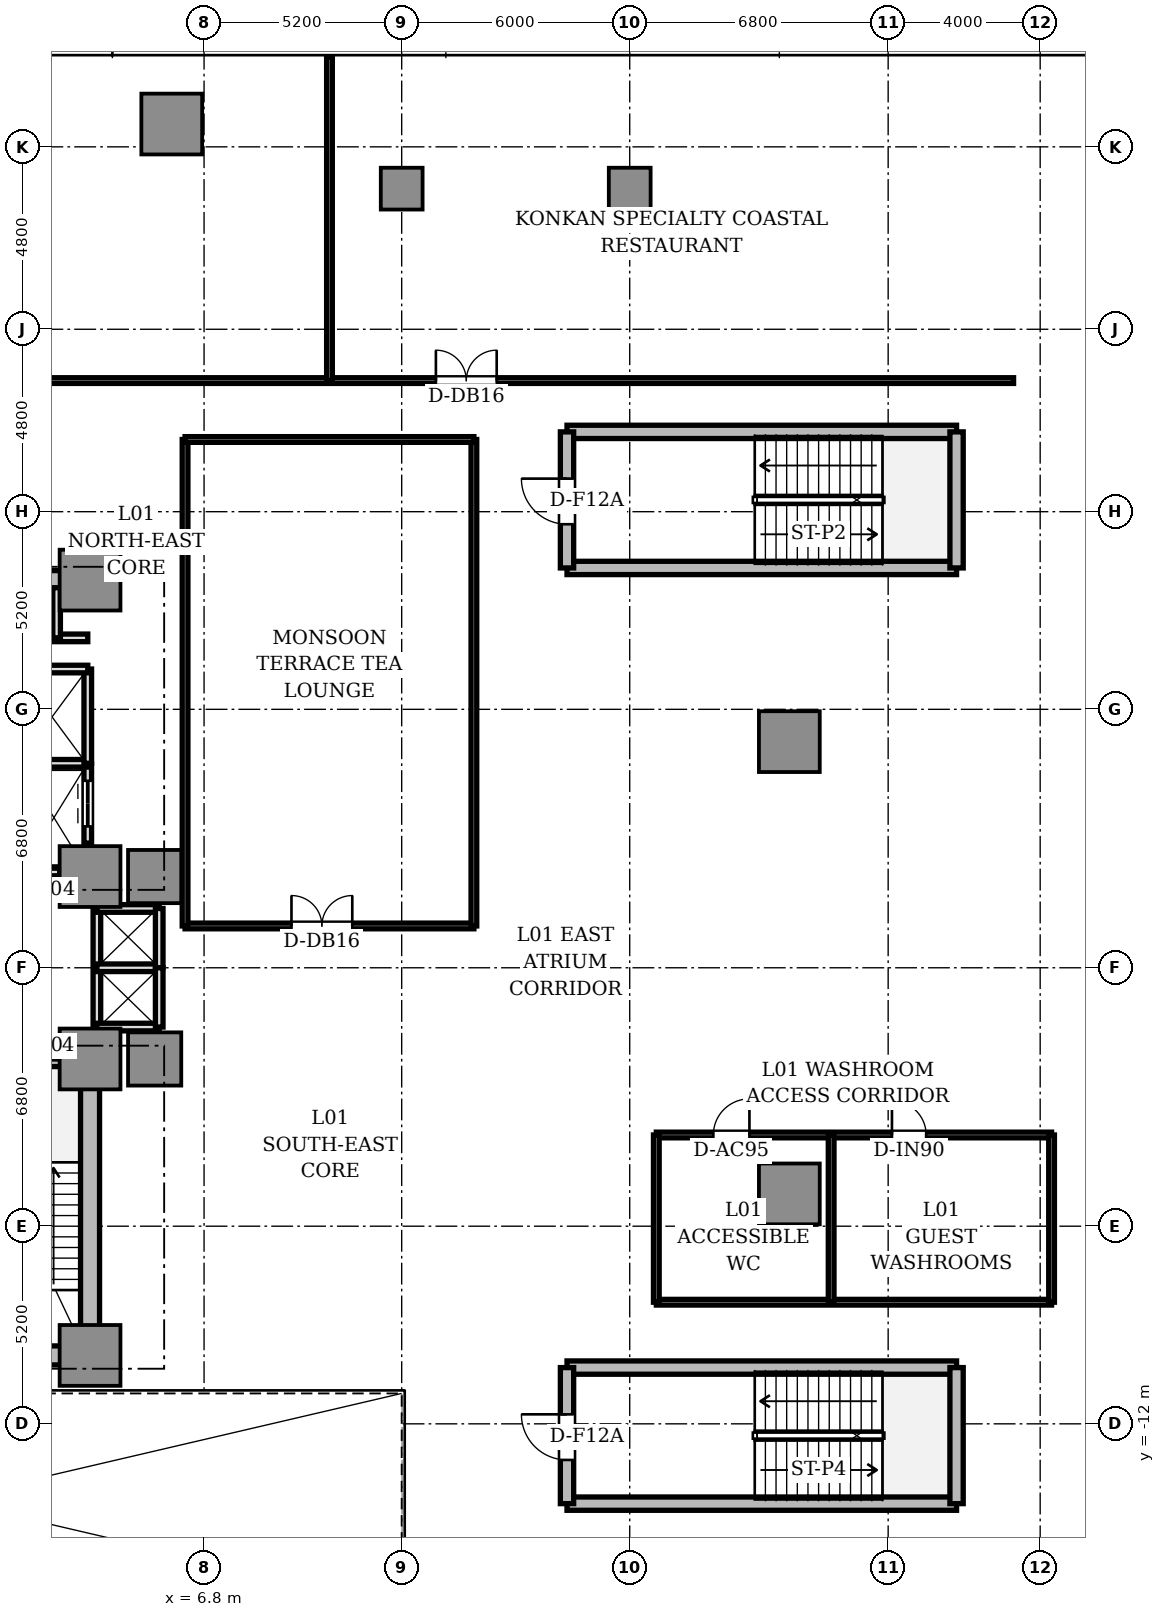
"""IFC4 building model, lengths in metres.
Left out: names, types, materials, properties, quantities, classifications, styles, units other than length and angle.
Written with IfcOpenShell. Run it as: python <this file> out.ifc"""

import sys

from ifc_helpers import new_model, si_unit, direction, frame, frame_2d, origin, origin_2d, place, context, subcontext, project, spatial, rectangle, circle, extrude, source, transform, mapped, element, fill, save


model = new_model("IFC4")
c1 = context("Model", 3, precision=1e-05, world=origin(), true_north=direction((0.0, 1.0)))
c2 = subcontext(c1, "Body", "Model", "MODEL_VIEW")
j1 = project(units=[si_unit("LENGTHUNIT", "METRE"), si_unit("PLANEANGLEUNIT", "RADIAN")], contexts=[c1])
p1 = place(None, origin())
s1 = spatial("IfcSite", under=j1, at=p1, CompositionType="ELEMENT")
p2 = place(p1, origin())
s2 = spatial("IfcBuilding", under=s1, at=p2, CompositionType="ELEMENT")
p3 = place(p2, frame((0.0, 0.0, 4.8)))
s3 = spatial("IfcBuildingStorey", under=s2, at=p3, CompositionType="ELEMENT", Elevation=4.8)
for number, where, z_axis, x_axis in (
    (1, (-3.55, 10.2, 0.0), (0.0, 0.0, 1.0), (1.0, 0.0, 0.0)),
    (2, (-3.55, -10.2, 0.0), (0.0, 0.0, 1.0), (1.0, 0.0, 0.0)),
):
    element("IfcWall", number, at=place(p3, frame(where, z_axis=z_axis, x_axis=x_axis)), inside=s3, PredefinedType="SHEAR", context=c2, shape_type="SweptSolid", body=[
        extrude(rectangle(XDim=7.1, YDim=0.5, at=frame_2d((3.55, 0.0))), origin(), (0.0, 0.0, 1.0), 4.1),
    ])
p4 = place(p3, frame((3.8, -9.75, 0.0), z_axis=(0.0, 0.0, 1.0), x_axis=(0.0, 1.0, 0.0)))
e3 = element("IfcWall", 3, at=p4, inside=s3, PredefinedType="SHEAR", context=c2, shape_type="SweptSolid", body=[
    extrude(rectangle(XDim=6.9, YDim=0.5, at=frame_2d((3.45, 0.0))), origin(), (0.0, 0.0, 1.0), 4.1),
])
m1 = source(origin(), c2, "Body", "SweptSolid", [
    extrude(rectangle(XDim=1.6, YDim=1.6, at=origin_2d()), origin(), (0.0, 0.0, 1.0), 4.1),
])
for number, where, z_axis, x_axis in (
    (4, (3.8, 2.4, 0.0), (0.0, 0.0, 1.0), (1.0, 0.0, 0.0)),
    (5, (3.8, 10.2, 0.0), (0.0, 0.0, 1.0), (1.0, 0.0, 0.0)),
    (6, (3.8, -2.4, 0.0), (0.0, 0.0, 1.0), (1.0, 0.0, 0.0)),
    (7, (3.8, -10.2, 0.0), (0.0, 0.0, 1.0), (1.0, 0.0, 0.0)),
):
    element("IfcColumn", number, at=place(p3, frame(where, z_axis=z_axis, x_axis=x_axis)), inside=s3, PredefinedType="COLUMN", context=c2, shape_type="MappedRepresentation", body=[
        mapped(m1, transform((0.0, 0.0, 0.0), scale=1.0)),
    ])
m2 = source(origin(), c2, "Body", "SweptSolid", [
    extrude(rectangle(XDim=1.4, YDim=1.4, at=origin_2d()), origin(), (0.0, 0.0, 1.0), 4.1),
])
for number, where, z_axis, x_axis in (
    (8, (5.5, 2.4, 0.0), (0.0, 0.0, 1.0), (1.0, 0.0, 0.0)),
    (9, (5.5, -2.4, 0.0), (0.0, 0.0, 1.0), (1.0, 0.0, 0.0)),
):
    element("IfcColumn", number, at=place(p3, frame(where, z_axis=z_axis, x_axis=x_axis)), inside=s3, PredefinedType="COLUMN", context=c2, shape_type="MappedRepresentation", body=[
        mapped(m2, transform((0.0, 0.0, 0.0), scale=1.0)),
    ])
for number, where, z_axis, x_axis in (
    (10, (22.2, -5.95, 0.0), (0.0, 0.0, 1.0), (1.0, 0.0, 0.0)),
    (11, (22.2, 5.95, 0.0), (0.0, 0.0, 1.0), (1.0, 0.0, 0.0)),
    (12, (5.95, 22.2, 0.0), (0.0, 0.0, 1.0), (1.0, 0.0, 0.0)),
):
    element("IfcColumn", number, at=place(p3, frame(where, z_axis=z_axis, x_axis=x_axis)), inside=s3, PredefinedType="COLUMN", context=c2, shape_type="MappedRepresentation", body=[
        mapped(m1, transform((0.0, 0.0, 0.0), scale=1.0)),
    ])
m3 = source(origin(), c2, "Body", "SweptSolid", [
    extrude(circle(Radius=0.55, at=origin_2d()), origin(), (0.0, 0.0, 1.0), 4.1),
])
for number, where, z_axis, x_axis in (
    (13, (12.0, 20.5, 0.0), (0.0, 0.0, 1.0), (1.0, 0.0, 0.0)),
    (14, (18.0, 20.5, 0.0), (0.0, 0.0, 1.0), (1.0, 0.0, 0.0)),
):
    element("IfcColumn", number, at=place(p3, frame(where, z_axis=z_axis, x_axis=x_axis)), inside=s3, PredefinedType="COLUMN", context=c2, shape_type="MappedRepresentation", body=[
        mapped(m3, transform((0.0, 0.0, 0.0), scale=1.0)),
    ])
p5 = place(p3, frame((0.0, -2.5, 0.0), z_axis=(0.0, 0.0, 1.0), x_axis=(1.0, 0.0, 0.0)))
e15 = element("IfcWall", 15, at=p5, inside=s3, PredefinedType="SOLIDWALL", context=c2, shape_type="SweptSolid", body=[
    extrude(rectangle(XDim=3.72, YDim=0.2, at=frame_2d((1.86, 0.0))), origin(), (0.0, 0.0, 1.0), 4.1),
])
p6 = place(p3, frame((2.0, 2.52, 0.0), z_axis=(0.0, 0.0, 1.0), x_axis=(1.0, 0.0, 0.0)))
e16 = element("IfcWall", 16, at=p6, inside=s3, PredefinedType="SOLIDWALL", context=c2, shape_type="SweptSolid", body=[
    extrude(rectangle(XDim=1.0, YDim=0.2, at=frame_2d((0.5, 0.0))), origin(), (0.0, 0.0, 1.0), 3.65),
])
p7 = place(p3, frame((3.74, 3.28, 0.0), z_axis=(0.0, 0.0, 1.0), x_axis=(0.0, 1.0, 0.0)))
e17 = element("IfcWall", 17, at=p7, inside=s3, PredefinedType="SOLIDWALL", context=c2, shape_type="SweptSolid", body=[
    extrude(rectangle(XDim=2.08, YDim=0.2, at=frame_2d((1.04, 0.0))), origin(), (0.0, 0.0, 1.0), 3.65),
])
p8 = place(p7, frame((0.44, 0.0, 0.0)))
e18 = element("IfcOpeningElement", 18, at=p8, cuts=e17, PredefinedType="OPENING", context=c2, shape_type="SweptSolid", body=[
    extrude(rectangle(XDim=1.2, YDim=2.2, at=frame_2d((0.6, 1.1))), frame((0.0, 0.11, 0.0), z_axis=(0.0, -1.0, 0.0), x_axis=(1.0, 0.0, 0.0)), (0.0, 0.0, 1.0), 0.22),
])
p9 = place(p3, frame((0.05, 5.38, 0.0), z_axis=(0.0, 0.0, 1.0), x_axis=(1.0, 0.0, 0.0)))
e19 = element("IfcWall", 19, at=p9, inside=s3, PredefinedType="SOLIDWALL", context=c2, shape_type="SweptSolid", body=[
    extrude(rectangle(XDim=3.69, YDim=0.2, at=frame_2d((1.845, 0.0))), origin(), (0.0, 0.0, 1.0), 3.65),
])
p10 = place(p3, frame((3.74, 5.38, 0.0), z_axis=(0.0, 0.0, 1.0), x_axis=(0.0, 1.0, 0.0)))
e20 = element("IfcWall", 20, at=p10, inside=s3, PredefinedType="SOLIDWALL", context=c2, shape_type="SweptSolid", body=[
    extrude(rectangle(XDim=2.48, YDim=0.2, at=frame_2d((1.24, 0.0))), origin(), (0.0, 0.0, 1.0), 3.65),
])
p11 = place(p3, frame((1.9, 7.86, 0.0), z_axis=(0.0, 0.0, 1.0), x_axis=(1.0, 0.0, 0.0)))
e21 = element("IfcWall", 21, at=p11, inside=s3, PredefinedType="SOLIDWALL", context=c2, shape_type="SweptSolid", body=[
    extrude(rectangle(XDim=1.84, YDim=0.2, at=frame_2d((0.92, 0.0))), origin(), (0.0, 0.0, 1.0), 3.65),
])
p12 = place(p3, frame((3.98, -1.56, 0.0), z_axis=(0.0, 0.0, 1.0), x_axis=(0.0, 1.0, 0.0)))
e22 = element("IfcWall", 22, at=p12, inside=s3, PredefinedType="SOLIDWALL", context=c2, shape_type="SweptSolid", body=[
    extrude(rectangle(XDim=3.12, YDim=0.2, at=frame_2d((1.56, 0.0))), origin(), (0.0, 0.0, 1.0), 3.17),
])
for number, where, z_axis, x_axis in (
    (23, (3.98, 1.56, 0.0), (0.0, 0.0, 1.0), (1.0, 0.0, 0.0)),
    (24, (3.98, -1.56, 0.0), (0.0, 0.0, 1.0), (1.0, 0.0, 0.0)),
    (25, (3.98, 0.0, 0.0), (0.0, 0.0, 1.0), (1.0, 0.0, 0.0)),
):
    element("IfcWall", number, at=place(p3, frame(where, z_axis=z_axis, x_axis=x_axis)), inside=s3, PredefinedType="SOLIDWALL", context=c2, shape_type="SweptSolid", body=[
        extrude(rectangle(XDim=1.64, YDim=0.2, at=frame_2d((0.82, 0.0))), origin(), (0.0, 0.0, 1.0), 3.65),
    ])
for number, where, z_axis, x_axis in (
    (26, (5.62, 0.0, 0.0), (0.0, 0.0, 1.0), (0.0, 1.0, 0.0)),
    (27, (5.62, -1.56, 0.0), (0.0, 0.0, 1.0), (0.0, 1.0, 0.0)),
):
    element("IfcWall", number, at=place(p3, frame(where, z_axis=z_axis, x_axis=x_axis)), inside=s3, PredefinedType="SOLIDWALL", context=c2, shape_type="SweptSolid", body=[
        extrude(rectangle(XDim=1.56, YDim=0.2, at=frame_2d((0.78, 0.0))), origin(), (0.0, 0.0, 1.0), 3.65),
    ])
p13 = place(p3, frame((0.12, 8.68, 0.0), z_axis=(0.0, 0.0, 1.0), x_axis=(1.0, 0.0, 0.0)))
e28 = element("IfcWall", 28, at=p13, inside=s3, PredefinedType="SOLIDWALL", context=c2, shape_type="SweptSolid", body=[
    extrude(rectangle(XDim=3.62, YDim=0.2, at=frame_2d((1.81, 0.0))), origin(), (0.0, 0.0, 1.0), 3.65),
])
p14 = place(p13, frame((1.75, 0.0, 0.0)))
e29 = element("IfcOpeningElement", 29, at=p14, cuts=e28, PredefinedType="OPENING", context=c2, shape_type="SweptSolid", body=[
    extrude(rectangle(XDim=0.95, YDim=2.15, at=frame_2d((0.475, 1.075))), frame((0.0, 0.11, 0.0), z_axis=(0.0, -1.0, 0.0), x_axis=(1.0, 0.0, 0.0)), (0.0, 0.0, 1.0), 0.22),
])
p15 = place(p3, frame((2.92, 8.68, 0.0), z_axis=(0.0, 0.0, 1.0), x_axis=(0.0, 1.0, 0.0)))
e30 = element("IfcWall", 30, at=p15, inside=s3, PredefinedType="SOLIDWALL", context=c2, shape_type="SweptSolid", body=[
    extrude(rectangle(XDim=1.32, YDim=0.2, at=frame_2d((0.66, 0.0))), origin(), (0.0, 0.0, 1.0), 3.65),
])
for number, where, z_axis, x_axis in (
    (31, (16.35, 14.1, 0.0), (0.0, 0.0, 1.0), (1.0, 0.0, 0.0)),
    (32, (16.35, 10.52, 0.0), (0.0, 0.0, 1.0), (1.0, 0.0, 0.0)),
):
    element("IfcWall", number, at=place(p3, frame(where, z_axis=z_axis, x_axis=x_axis)), inside=s3, PredefinedType="SHEAR", context=c2, shape_type="SweptSolid", body=[
        extrude(rectangle(XDim=10.25, YDim=0.35, at=frame_2d((5.125, 0.0))), origin(), (0.0, 0.0, 1.0), 4.1),
    ])
p16 = place(p3, frame((16.35, 10.52, 0.0), z_axis=(0.0, 0.0, 1.0), x_axis=(0.0, 1.0, 0.0)))
e33 = element("IfcWall", 33, at=p16, inside=s3, PredefinedType="SHEAR", context=c2, shape_type="SweptSolid", body=[
    extrude(rectangle(XDim=3.58, YDim=0.35, at=frame_2d((1.79, 0.0))), origin(), (0.0, 0.0, 1.0), 4.1),
])
p17 = place(p16, frame((1.15, 0.0, 0.0)))
e34 = element("IfcOpeningElement", 34, at=p17, cuts=e33, PredefinedType="OPENING", context=c2, shape_type="SweptSolid", body=[
    extrude(rectangle(XDim=1.2, YDim=2.2, at=frame_2d((0.6, 1.1))), frame((0.0, 0.185, 0.0), z_axis=(0.0, -1.0, 0.0), x_axis=(1.0, 0.0, 0.0)), (0.0, 0.0, 1.0), 0.37),
])
p18 = place(p3, frame((26.6, 10.52, 0.0), z_axis=(0.0, 0.0, 1.0), x_axis=(0.0, 1.0, 0.0)))
e35 = element("IfcWall", 35, at=p18, inside=s3, PredefinedType="SHEAR", context=c2, shape_type="SweptSolid", body=[
    extrude(rectangle(XDim=3.58, YDim=0.35, at=frame_2d((1.79, 0.0))), origin(), (0.0, 0.0, 1.0), 4.1),
])
for number, where, z_axis, x_axis in (
    (36, (16.35, -10.52, 0.0), (0.0, 0.0, 1.0), (1.0, 0.0, 0.0)),
    (37, (16.35, -14.1, 0.0), (0.0, 0.0, 1.0), (1.0, 0.0, 0.0)),
):
    element("IfcWall", number, at=place(p3, frame(where, z_axis=z_axis, x_axis=x_axis)), inside=s3, PredefinedType="SHEAR", context=c2, shape_type="SweptSolid", body=[
        extrude(rectangle(XDim=10.25, YDim=0.35, at=frame_2d((5.125, 0.0))), origin(), (0.0, 0.0, 1.0), 4.1),
    ])
p19 = place(p3, frame((16.35, -14.1, 0.0), z_axis=(0.0, 0.0, 1.0), x_axis=(0.0, 1.0, 0.0)))
e38 = element("IfcWall", 38, at=p19, inside=s3, PredefinedType="SHEAR", context=c2, shape_type="SweptSolid", body=[
    extrude(rectangle(XDim=3.58, YDim=0.35, at=frame_2d((1.79, 0.0))), origin(), (0.0, 0.0, 1.0), 4.1),
])
p20 = place(p19, frame((1.15, 0.0, 0.0)))
e39 = element("IfcOpeningElement", 39, at=p20, cuts=e38, PredefinedType="OPENING", context=c2, shape_type="SweptSolid", body=[
    extrude(rectangle(XDim=1.2, YDim=2.2, at=frame_2d((0.6, 1.1))), frame((0.0, 0.185, 0.0), z_axis=(0.0, -1.0, 0.0), x_axis=(1.0, 0.0, 0.0)), (0.0, 0.0, 1.0), 0.37),
])
p21 = place(p3, frame((26.6, -14.1, 0.0), z_axis=(0.0, 0.0, 1.0), x_axis=(0.0, 1.0, 0.0)))
e40 = element("IfcWall", 40, at=p21, inside=s3, PredefinedType="SHEAR", context=c2, shape_type="SweptSolid", body=[
    extrude(rectangle(XDim=3.58, YDim=0.35, at=frame_2d((1.79, 0.0))), origin(), (0.0, 0.0, 1.0), 4.1),
])
p22 = place(p3, frame((-25.1, 15.45, 0.0), z_axis=(0.0, 0.0, 1.0), x_axis=(1.0, 0.0, 0.0)))
e41 = element("IfcWall", 41, at=p22, inside=s3, PredefinedType="PARTITIONING", context=c2, shape_type="SweptSolid", body=[
    extrude(rectangle(XDim=53.2, YDim=0.15, at=frame_2d((26.6, 0.0))), origin(), (0.0, 0.0, 1.0), 3.65),
])
p23 = place(p22, frame((19.5, 0.0, 0.0)))
e42 = element("IfcOpeningElement", 42, at=p23, cuts=e41, PredefinedType="OPENING", context=c2, shape_type="SweptSolid", body=[
    extrude(rectangle(XDim=1.6, YDim=2.25, at=frame_2d((0.8, 1.125))), frame((0.0, 0.085, 0.0), z_axis=(0.0, -1.0, 0.0), x_axis=(1.0, 0.0, 0.0)), (0.0, 0.0, 1.0), 0.17),
])
p24 = place(p22, frame((38.0, 0.0, 0.0)))
e43 = element("IfcOpeningElement", 43, at=p24, cuts=e41, PredefinedType="OPENING", context=c2, shape_type="SweptSolid", body=[
    extrude(rectangle(XDim=1.6, YDim=2.25, at=frame_2d((0.8, 1.125))), frame((0.0, 0.085, 0.0), z_axis=(0.0, -1.0, 0.0), x_axis=(1.0, 0.0, 0.0)), (0.0, 0.0, 1.0), 0.17),
])
p25 = place(p3, frame((10.1, 15.45, 0.0), z_axis=(0.0, 0.0, 1.0), x_axis=(0.0, 1.0, 0.0)))
e44 = element("IfcWall", 44, at=p25, inside=s3, PredefinedType="PARTITIONING", context=c2, shape_type="SweptSolid", body=[
    extrude(rectangle(XDim=8.52, YDim=0.15, at=frame_2d((4.26, 0.0))), origin(), (0.0, 0.0, 1.0), 3.65),
])
p26 = place(p3, frame((6.3, 1.1, 0.0), z_axis=(0.0, 0.0, 1.0), x_axis=(1.0, 0.0, 0.0)))
e45 = element("IfcWall", 45, at=p26, inside=s3, PredefinedType="PARTITIONING", context=c2, shape_type="SweptSolid", body=[
    extrude(rectangle(XDim=7.6, YDim=0.15, at=frame_2d((3.8, 0.0))), origin(), (0.0, 0.0, 1.0), 3.65),
])
p27 = place(p26, frame((2.8, 0.0, 0.0)))
e46 = element("IfcOpeningElement", 46, at=p27, cuts=e45, PredefinedType="OPENING", context=c2, shape_type="SweptSolid", body=[
    extrude(rectangle(XDim=1.6, YDim=2.25, at=frame_2d((0.8, 1.125))), frame((0.0, 0.085, 0.0), z_axis=(0.0, -1.0, 0.0), x_axis=(1.0, 0.0, 0.0)), (0.0, 0.0, 1.0), 0.17),
])
for number, where, z_axis, x_axis in (
    (47, (6.3, 1.1, 0.0), (0.0, 0.0, 1.0), (0.0, 1.0, 0.0)),
    (48, (13.9, 1.1, 0.0), (0.0, 0.0, 1.0), (0.0, 1.0, 0.0)),
):
    element("IfcWall", number, at=place(p3, frame(where, z_axis=z_axis, x_axis=x_axis)), inside=s3, PredefinedType="PARTITIONING", context=c2, shape_type="SweptSolid", body=[
        extrude(rectangle(XDim=12.8, YDim=0.15, at=frame_2d((6.4, 0.0))), origin(), (0.0, 0.0, 1.0), 3.65),
    ])
p28 = place(p3, frame((6.3, 13.9, 0.0), z_axis=(0.0, 0.0, 1.0), x_axis=(1.0, 0.0, 0.0)))
e49 = element("IfcWall", 49, at=p28, inside=s3, PredefinedType="PARTITIONING", context=c2, shape_type="SweptSolid", body=[
    extrude(rectangle(XDim=7.6, YDim=0.15, at=frame_2d((3.8, 0.0))), origin(), (0.0, 0.0, 1.0), 3.65),
])
p29 = place(p3, frame((18.7, -4.4, 0.0), z_axis=(0.0, 0.0, 1.0), x_axis=(1.0, 0.0, 0.0)))
e50 = element("IfcWall", 50, at=p29, inside=s3, PredefinedType="PARTITIONING", context=c2, shape_type="SweptSolid", body=[
    extrude(rectangle(XDim=10.4, YDim=0.15, at=frame_2d((5.2, 0.0))), origin(), (0.0, 0.0, 1.0), 3.57),
])
p30 = place(p29, frame((1.5, 0.0, 0.0)))
e51 = element("IfcOpeningElement", 51, at=p30, cuts=e50, PredefinedType="OPENING", context=c2, shape_type="SweptSolid", body=[
    extrude(rectangle(XDim=0.95, YDim=2.15, at=frame_2d((0.475, 1.075))), frame((0.0, 0.085, 0.0), z_axis=(0.0, -1.0, 0.0), x_axis=(1.0, 0.0, 0.0)), (0.0, 0.0, 1.0), 0.17),
])
p31 = place(p29, frame((6.2, 0.0, 0.0)))
e52 = element("IfcOpeningElement", 52, at=p31, cuts=e50, PredefinedType="OPENING", context=c2, shape_type="SweptSolid", body=[
    extrude(rectangle(XDim=0.9, YDim=2.1, at=frame_2d((0.45, 1.05))), frame((0.0, 0.085, 0.0), z_axis=(0.0, -1.0, 0.0), x_axis=(1.0, 0.0, 0.0)), (0.0, 0.0, 1.0), 0.17),
])
p32 = place(p3, frame((18.7, -8.8, 0.0), z_axis=(0.0, 0.0, 1.0), x_axis=(1.0, 0.0, 0.0)))
e53 = element("IfcWall", 53, at=p32, inside=s3, PredefinedType="PARTITIONING", context=c2, shape_type="SweptSolid", body=[
    extrude(rectangle(XDim=10.4, YDim=0.15, at=frame_2d((5.2, 0.0))), origin(), (0.0, 0.0, 1.0), 3.65),
])
for number, where, z_axis, x_axis in (
    (54, (18.7, -8.8, 0.0), (0.0, 0.0, 1.0), (0.0, 1.0, 0.0)),
    (55, (23.3, -8.8, 0.0), (0.0, 0.0, 1.0), (0.0, 1.0, 0.0)),
    (56, (29.1, -8.8, 0.0), (0.0, 0.0, 1.0), (0.0, 1.0, 0.0)),
):
    element("IfcWall", number, at=place(p3, frame(where, z_axis=z_axis, x_axis=x_axis)), inside=s3, PredefinedType="PARTITIONING", context=c2, shape_type="SweptSolid", body=[
        extrude(rectangle(XDim=4.4, YDim=0.15, at=frame_2d((2.2, 0.0))), origin(), (0.0, 0.0, 1.0), 3.65),
    ])
m4 = source(origin(), c2, "Body", "SweptSolid", [
    extrude(rectangle(XDim=1.2, YDim=0.05, at=origin_2d()), origin(), (0.0, 0.0, 1.0), 2.2),
])
p33 = place(p8, frame((0.6, 0.0, 0.0)))
e57 = element("IfcDoor", 57, at=p33, inside=s3, OperationType="DOUBLE_DOOR_SLIDING", PredefinedType="DOOR", context=c2, shape_type="MappedRepresentation", body=[
    mapped(m4, transform((0.0, 0.0, 0.0), scale=1.0)),
])
fill(e18, e57)
m5 = source(origin(), c2, "Body", "SweptSolid", [
    extrude(rectangle(XDim=0.95, YDim=0.05, at=origin_2d()), origin(), (0.0, 0.0, 1.0), 2.15),
])
p34 = place(p14, frame((0.475, 0.0, 0.0)))
e58 = element("IfcDoor", 58, at=p34, inside=s3, OperationType="SINGLE_SWING_RIGHT", PredefinedType="DOOR", context=c2, shape_type="MappedRepresentation", body=[
    mapped(m5, transform((0.0, 0.0, 0.0), scale=1.0)),
])
fill(e29, e58)
p35 = place(p17, frame((0.6, 0.0, 0.0)))
e59 = element("IfcDoor", 59, at=p35, inside=s3, OperationType="SINGLE_SWING_RIGHT", PredefinedType="DOOR", context=c2, shape_type="MappedRepresentation", body=[
    mapped(m4, transform((0.0, 0.0, 0.0), scale=1.0)),
])
fill(e34, e59)
p36 = place(p20, frame((0.6, 0.0, 0.0)))
e60 = element("IfcDoor", 60, at=p36, inside=s3, OperationType="SINGLE_SWING_RIGHT", PredefinedType="DOOR", context=c2, shape_type="MappedRepresentation", body=[
    mapped(m4, transform((0.0, 0.0, 0.0), scale=1.0)),
])
fill(e39, e60)
m6 = source(origin(), c2, "Body", "SweptSolid", [
    extrude(rectangle(XDim=1.6, YDim=0.05, at=origin_2d()), origin(), (0.0, 0.0, 1.0), 2.25),
])
p37 = place(p24, frame((0.8, 0.0, 0.0)))
e61 = element("IfcDoor", 61, at=p37, inside=s3, OperationType="DOUBLE_DOOR_SINGLE_SWING", PredefinedType="DOOR", context=c2, shape_type="MappedRepresentation", body=[
    mapped(m6, transform((0.0, 0.0, 0.0), scale=1.0)),
])
fill(e43, e61)
p38 = place(p27, frame((0.8, 0.0, 0.0)))
e62 = element("IfcDoor", 62, at=p38, inside=s3, OperationType="DOUBLE_DOOR_SINGLE_SWING", PredefinedType="DOOR", context=c2, shape_type="MappedRepresentation", body=[
    mapped(m6, transform((0.0, 0.0, 0.0), scale=1.0)),
])
fill(e46, e62)
p39 = place(p30, frame((0.475, 0.0, 0.0)))
e63 = element("IfcDoor", 63, at=p39, inside=s3, OperationType="SINGLE_SWING_RIGHT", PredefinedType="DOOR", context=c2, shape_type="MappedRepresentation", body=[
    mapped(m5, transform((0.0, 0.0, 0.0), scale=1.0)),
])
fill(e51, e63)
m7 = source(origin(), c2, "Body", "SweptSolid", [
    extrude(rectangle(XDim=0.9, YDim=0.05, at=origin_2d()), origin(), (0.0, 0.0, 1.0), 2.1),
])
p40 = place(p31, frame((0.45, 0.0, 0.0)))
e64 = element("IfcDoor", 64, at=p40, inside=s3, OperationType="SINGLE_SWING_LEFT", PredefinedType="DOOR", context=c2, shape_type="MappedRepresentation", body=[
    mapped(m7, transform((0.0, 0.0, 0.0), scale=1.0)),
])
fill(e52, e64)
save(model, sys.argv[1])
